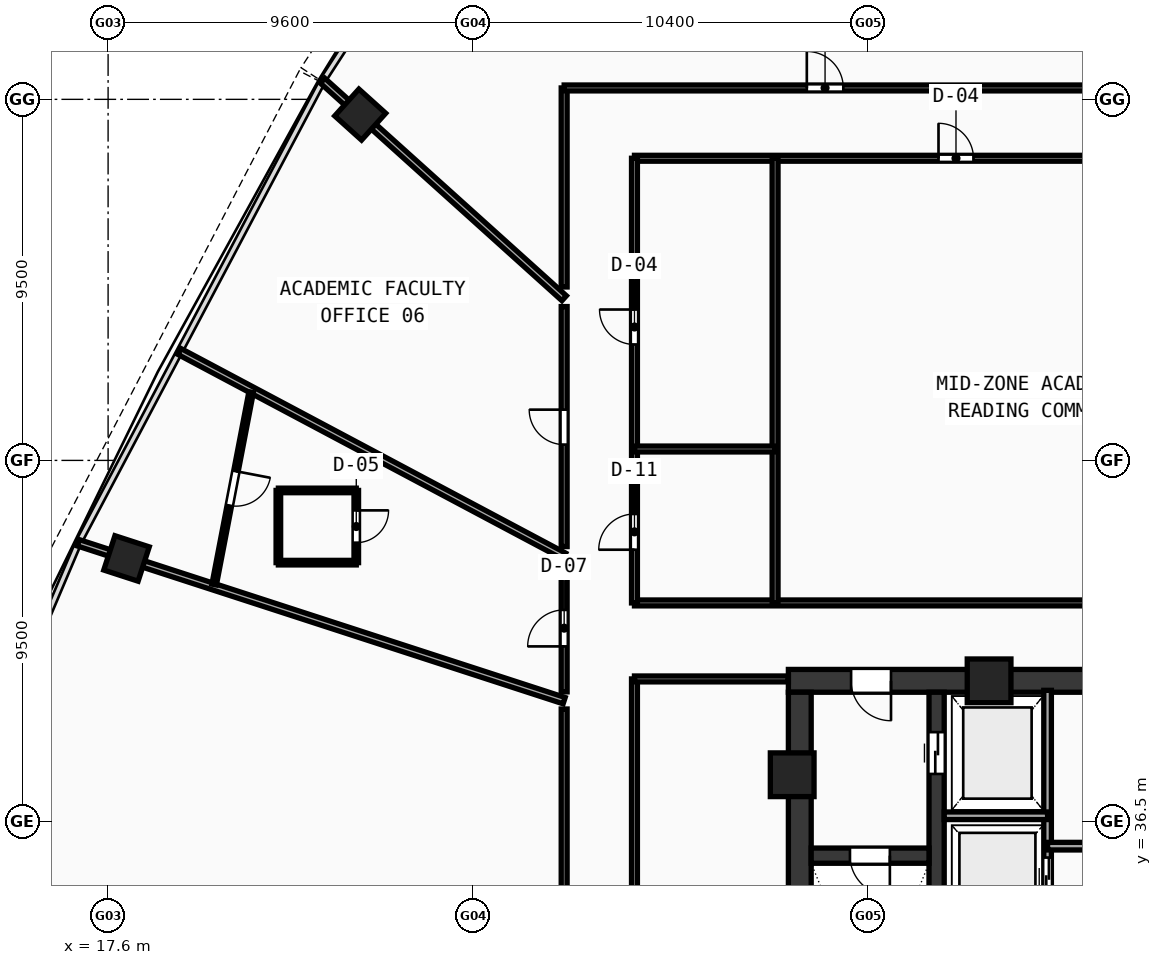
"""IFC4 building model, lengths in metres.
Left out: names, types, materials, properties, quantities, classifications, styles, units other than length and angle.
Written with IfcOpenShell. Run it as: python <this file> out.ifc"""

import sys

from ifc_helpers import new_model, si_unit, direction, frame, frame_2d, origin, origin_with_axes, origin_2d, place, context, subcontext, project, spatial, rectangle, hollow_rectangle, extrude, source, transform, mapped, element, fill, save


model = new_model("IFC4")
c1 = context("Model", 3, precision=1e-05, world=origin(), true_north=direction((0.0, 1.0)))
c2 = subcontext(c1, "Body", "Model", "MODEL_VIEW")
j1 = project(units=[si_unit("LENGTHUNIT", "METRE"), si_unit("PLANEANGLEUNIT", "RADIAN")], contexts=[c1])
p1 = place(None, origin())
s1 = spatial("IfcSite", under=j1, at=p1, CompositionType="ELEMENT")
p2 = place(p1, origin())
s2 = spatial("IfcBuilding", under=s1, at=p2, CompositionType="ELEMENT")
p3 = place(p2, frame((0.0, 0.0, 151.91)))
s3 = spatial("IfcBuildingStorey", under=s2, at=p3, CompositionType="ELEMENT", Elevation=151.91)
p4 = place(p3, frame((35.5, 40.2, 0.0), z_axis=(0.0, 0.0, 1.0), x_axis=(1.0, 0.0, 0.0)))
e1 = element("IfcWall", 1, at=p4, inside=s3, PredefinedType="SHEAR", context=c2, shape_type="SweptSolid", body=[
    extrude(rectangle(XDim=11.3, YDim=0.6, at=frame_2d((5.65, 0.0))), origin(), (0.0, 0.0, 1.0), 3.42),
])
p5 = place(p4, frame((1.65, 0.0, 0.0)))
e2 = element("IfcOpeningElement", 2, at=p5, cuts=e1, PredefinedType="OPENING", context=c2, shape_type="SweptSolid", body=[
    extrude(rectangle(XDim=1.05, YDim=2.1, at=frame_2d((0.525, 1.05))), frame((0.0, 0.31, 0.0), z_axis=(0.0, -1.0, 0.0), x_axis=(1.0, 0.0, 0.0)), (0.0, 0.0, 1.0), 0.62),
])
p6 = place(p3, frame((35.8, 27.8, 0.0), z_axis=(0.0, 0.0, 1.0), x_axis=(0.0, 1.0, 0.0)))
e3 = element("IfcWall", 3, at=p6, inside=s3, PredefinedType="SHEAR", context=c2, shape_type="SweptSolid", body=[
    extrude(rectangle(XDim=12.1, YDim=0.6, at=frame_2d((6.05, 0.0))), origin(), (0.0, 0.0, 1.0), 3.42),
])
p7 = place(p3, frame((39.4, 27.8, 0.0), z_axis=(0.0, 0.0, 1.0), x_axis=(0.0, 1.0, 0.0)))
e4 = element("IfcWall", 4, at=p7, inside=s3, PredefinedType="SHEAR", context=c2, shape_type="SweptSolid", body=[
    extrude(rectangle(XDim=12.1, YDim=0.4, at=frame_2d((6.05, 0.0))), origin(), (0.0, 0.0, 1.0), 3.42),
])
p8 = place(p7, frame((9.95, 0.0, 0.0)))
e5 = element("IfcOpeningElement", 5, at=p8, cuts=e4, PredefinedType="OPENING", context=c2, shape_type="SweptSolid", body=[
    extrude(rectangle(XDim=1.1, YDim=2.1, at=frame_2d((0.55, 1.05))), frame((0.0, 0.21, 0.0), z_axis=(0.0, -1.0, 0.0), x_axis=(1.0, 0.0, 0.0)), (0.0, 0.0, 1.0), 0.42),
])
p9 = place(p3, frame((36.1, 35.6, 0.0), z_axis=(0.0, 0.0, 1.0), x_axis=(1.0, 0.0, 0.0)))
e6 = element("IfcWall", 6, at=p9, inside=s3, PredefinedType="SHEAR", context=c2, shape_type="SweptSolid", body=[
    extrude(rectangle(XDim=3.1, YDim=0.4, at=frame_2d((1.55, 0.0))), origin(), (0.0, 0.0, 1.0), 3.42),
])
p10 = place(p9, frame((1.02, 0.0, 0.0)))
e7 = element("IfcOpeningElement", 7, at=p10, cuts=e6, PredefinedType="OPENING", context=c2, shape_type="SweptSolid", body=[
    extrude(rectangle(XDim=1.05, YDim=2.1, at=frame_2d((0.525, 1.05))), frame((0.0, 0.21, 0.0), z_axis=(0.0, -1.0, 0.0), x_axis=(1.0, 0.0, 0.0)), (0.0, 0.0, 1.0), 0.42),
])
m1 = source(origin(), c2, "Body", "SweptSolid", [
    extrude(hollow_rectangle(XDim=1.15, YDim=1.15, WallThickness=0.048, at=origin_2d()), origin(), (0.0, 0.0, 1.0), 3.68),
])
for number, where, z_axis, x_axis in (
    (8, (40.781, 40.2, -0.26), (0.0, 0.0, 1.0), (1.0, 0.0, 0.0)),
    (9, (35.6, 37.729, -0.26), (0.0, 0.0, 1.0), (1.0, 0.0, 0.0)),
):
    element("IfcColumn", number, at=place(p3, frame(where, z_axis=z_axis, x_axis=x_axis)), inside=s3, PredefinedType="COLUMN", context=c2, shape_type="MappedRepresentation", body=[
        mapped(m1, transform((0.0, 0.0, 0.0), scale=1.0)),
    ])
m2 = source(origin(), c2, "Body", "SweptSolid", [
    extrude(hollow_rectangle(XDim=0.95, YDim=0.95, WallThickness=0.04, at=origin_2d()), origin(), (0.0, 0.0, 1.0), 3.68),
])
for number, where, z_axis, x_axis in (
    (10, (24.234, 55.099, -0.26), (0.0, 0.0, 1.0), (-0.669, -0.743, 0.0)),
    (11, (18.085, 43.42, -0.26), (0.0, 0.0, 1.0), (-0.309, -0.951, 0.0)),
):
    element("IfcColumn", number, at=place(p3, frame(where, z_axis=z_axis, x_axis=x_axis)), inside=s3, PredefinedType="COLUMN", context=c2, shape_type="MappedRepresentation", body=[
        mapped(m2, transform((0.0, 0.0, 0.0), scale=1.0)),
    ])
p11 = place(p3, frame((42.32, 33.5, 0.0), z_axis=(0.0, 0.0, 1.0), x_axis=(0.0, 1.0, 0.0)))
e12 = element("IfcWall", 12, at=p11, inside=s3, PredefinedType="SOLIDWALL", context=c2, shape_type="SweptSolid", body=[
    extrude(rectangle(XDim=6.45, YDim=0.2, at=frame_2d((3.225, 0.0))), origin(), (0.0, 0.0, 1.0), 3.42),
])
p12 = place(p11, frame((1.0, 0.0, 0.0)))
e13 = element("IfcOpeningElement", 13, at=p12, cuts=e12, PredefinedType="OPENING", context=c2, shape_type="SweptSolid", body=[
    extrude(rectangle(XDim=1.05, YDim=2.1, at=frame_2d((0.525, 1.05))), frame((0.0, 0.11, 0.0), z_axis=(0.0, -1.0, 0.0), x_axis=(1.0, 0.0, 0.0)), (0.0, 0.0, 1.0), 0.22),
])
p13 = place(p3, frame((39.6, 36.65, 0.0), z_axis=(0.0, 0.0, 1.0), x_axis=(1.0, 0.0, 0.0)))
e14 = element("IfcWall", 14, at=p13, inside=s3, PredefinedType="SOLIDWALL", context=c2, shape_type="SweptSolid", body=[
    extrude(rectangle(XDim=2.72, YDim=0.2, at=frame_2d((1.36, 0.0))), origin(), (0.0, 0.0, 1.0), 3.42),
])
p14 = place(p3, frame((42.32, 35.85, 0.0), z_axis=(0.0, 0.0, 1.0), x_axis=(1.0, 0.0, 0.0)))
e15 = element("IfcWall", 15, at=p14, inside=s3, PredefinedType="SOLIDWALL", context=c2, shape_type="SweptSolid", body=[
    extrude(rectangle(XDim=4.73, YDim=0.2, at=frame_2d((2.365, 0.0))), origin(), (0.0, 0.0, 1.0), 3.42),
])
p15 = place(p14, frame((1.8, 0.0, 0.0)))
e16 = element("IfcOpeningElement", 16, at=p15, cuts=e15, PredefinedType="OPENING", context=c2, shape_type="SweptSolid", body=[
    extrude(rectangle(XDim=0.9, YDim=2.1, at=frame_2d((0.45, 1.05))), frame((0.0, 0.11, 0.0), z_axis=(0.0, -1.0, 0.0), x_axis=(1.0, 0.0, 0.0)), (0.0, 0.0, 1.0), 0.22),
])
p16 = place(p3, frame((31.45, 42.25, 0.0), z_axis=(0.0, 0.0, 1.0), x_axis=(1.0, 0.0, 0.0)))
e17 = element("IfcWall", 17, at=p16, inside=s3, PredefinedType="PARTITIONING", context=c2, shape_type="SweptSolid", body=[
    extrude(rectangle(XDim=33.1, YDim=0.155, at=frame_2d((16.55, 0.0))), origin(), (0.0, 0.0, 1.0), 2.77),
])
p17 = place(p3, frame((31.45, 53.95, 0.0), z_axis=(0.0, 0.0, 1.0), x_axis=(1.0, 0.0, 0.0)))
e18 = element("IfcWall", 18, at=p17, inside=s3, PredefinedType="PARTITIONING", context=c2, shape_type="SweptSolid", body=[
    extrude(rectangle(XDim=33.1, YDim=0.155, at=frame_2d((16.55, 0.0))), origin(), (0.0, 0.0, 1.0), 2.77),
])
p18 = place(p17, frame((8.0, 0.0, 0.0)))
e19 = element("IfcOpeningElement", 19, at=p18, cuts=e18, PredefinedType="OPENING", context=c2, shape_type="SweptSolid", body=[
    extrude(rectangle(XDim=0.92, YDim=2.1, at=frame_2d((0.46, 1.05))), frame((0.0, 0.087, 0.0), z_axis=(0.0, -1.0, 0.0), x_axis=(1.0, 0.0, 0.0)), (0.0, 0.0, 1.0), 0.175),
])
p19 = place(p17, frame((20.55, 0.0, 0.0)))
e20 = element("IfcOpeningElement", 20, at=p19, cuts=e18, PredefinedType="OPENING", context=c2, shape_type="SweptSolid", body=[
    extrude(rectangle(XDim=0.92, YDim=2.1, at=frame_2d((0.46, 1.05))), frame((0.0, 0.087, 0.0), z_axis=(0.0, -1.0, 0.0), x_axis=(1.0, 0.0, 0.0)), (0.0, 0.0, 1.0), 0.175),
])
p20 = place(p3, frame((31.45, 42.25, 0.0), z_axis=(0.0, 0.0, 1.0), x_axis=(0.0, 1.0, 0.0)))
e21 = element("IfcWall", 21, at=p20, inside=s3, PredefinedType="PARTITIONING", context=c2, shape_type="SweptSolid", body=[
    extrude(rectangle(XDim=11.7, YDim=0.155, at=frame_2d((5.85, 0.0))), origin(), (0.0, 0.0, 1.0), 2.77),
])
p21 = place(p20, frame((1.4, 0.0, 0.0)))
e22 = element("IfcOpeningElement", 22, at=p21, cuts=e21, PredefinedType="OPENING", context=c2, shape_type="SweptSolid", body=[
    extrude(rectangle(XDim=0.94, YDim=2.1, at=frame_2d((0.47, 1.05))), frame((0.0, 0.087, 0.0), z_axis=(0.0, -1.0, 0.0), x_axis=(1.0, 0.0, 0.0)), (0.0, 0.0, 1.0), 0.175),
])
p22 = place(p20, frame((6.8, 0.0, 0.0)))
e23 = element("IfcOpeningElement", 23, at=p22, cuts=e21, PredefinedType="OPENING", context=c2, shape_type="SweptSolid", body=[
    extrude(rectangle(XDim=0.92, YDim=2.1, at=frame_2d((0.46, 1.05))), frame((0.0, 0.087, 0.0), z_axis=(0.0, -1.0, 0.0), x_axis=(1.0, 0.0, 0.0)), (0.0, 0.0, 1.0), 0.175),
])
p23 = place(p3, frame((35.15, 42.25, 0.0), z_axis=(0.0, 0.0, 1.0), x_axis=(0.0, 1.0, 0.0)))
e24 = element("IfcWall", 24, at=p23, inside=s3, PredefinedType="PARTITIONING", context=c2, shape_type="SweptSolid", body=[
    extrude(rectangle(XDim=11.7, YDim=0.155, at=frame_2d((5.85, 0.0))), origin(), (0.0, 0.0, 1.0), 2.77),
])
p24 = place(p3, frame((31.45, 46.3, 0.0), z_axis=(0.0, 0.0, 1.0), x_axis=(1.0, 0.0, 0.0)))
e25 = element("IfcWall", 25, at=p24, inside=s3, PredefinedType="PARTITIONING", context=c2, shape_type="SweptSolid", body=[
    extrude(rectangle(XDim=3.7, YDim=0.155, at=frame_2d((1.85, 0.0))), origin(), (0.0, 0.0, 1.0), 2.77),
])
p25 = place(p3, frame((31.45, 23.65, 0.0), z_axis=(0.0, 0.0, 1.0), x_axis=(0.0, 1.0, 0.0)))
e26 = element("IfcWall", 26, at=p25, inside=s3, PredefinedType="PARTITIONING", context=c2, shape_type="SweptSolid", body=[
    extrude(rectangle(XDim=16.6, YDim=0.155, at=frame_2d((8.3, 0.0))), origin(), (0.0, 0.0, 1.0), 2.77),
])
p26 = place(p25, frame((7.5, 0.0, 0.0)))
e27 = element("IfcOpeningElement", 27, at=p26, cuts=e26, PredefinedType="OPENING", context=c2, shape_type="SweptSolid", body=[
    extrude(rectangle(XDim=0.9, YDim=2.08, at=frame_2d((0.45, 1.04))), frame((0.0, 0.087, 0.0), z_axis=(0.0, -1.0, 0.0), x_axis=(1.0, 0.0, 0.0)), (0.0, 0.0, 1.0), 0.175),
])
p27 = place(p3, frame((31.45, 40.25, 0.0), z_axis=(0.0, 0.0, 1.0), x_axis=(1.0, 0.0, 0.0)))
e28 = element("IfcWall", 28, at=p27, inside=s3, PredefinedType="PARTITIONING", context=c2, shape_type="SweptSolid", body=[
    extrude(rectangle(XDim=4.05, YDim=0.155, at=frame_2d((2.025, 0.0))), origin(), (0.0, 0.0, 1.0), 3.42),
])
p28 = place(p3, frame((29.6, 50.267, 0.0), z_axis=(0.0, 0.0, 1.0), x_axis=(-0.743147926867, 0.669127161901, 0.0)))
e29 = element("IfcWall", 29, at=p28, inside=s3, PredefinedType="PARTITIONING", context=c2, shape_type="SweptSolid", body=[
    extrude(rectangle(XDim=8.552, YDim=0.175, at=frame_2d((4.276, 0.0))), origin(), (0.0, 0.0, 1.0), 2.77),
])
p29 = place(p3, frame((29.6, 43.483, 0.0), z_axis=(0.0, 0.0, 1.0), x_axis=(-0.882944706502, 0.469476991193, 0.0)))
e30 = element("IfcWall", 30, at=p29, inside=s3, PredefinedType="PARTITIONING", context=c2, shape_type="SweptSolid", body=[
    extrude(rectangle(XDim=11.464, YDim=0.175, at=frame_2d((5.732, 0.0))), origin(), (0.0, 0.0, 1.0), 2.77),
])
p30 = place(p3, frame((29.6, 39.678, 0.0), z_axis=(0.0, 0.0, 1.0), x_axis=(-0.951059027278, 0.309009266259, 0.0)))
e31 = element("IfcWall", 31, at=p30, inside=s3, PredefinedType="PARTITIONING", context=c2, shape_type="SweptSolid", body=[
    extrude(rectangle(XDim=13.441, YDim=0.175, at=frame_2d((6.72, 0.0))), origin(), (0.0, 0.0, 1.0), 2.77),
])
p31 = place(p3, frame((29.6, 21.8, 0.0), z_axis=(0.0, 0.0, 1.0), x_axis=(0.0, 1.0, 0.0)))
e32 = element("IfcWall", 32, at=p31, inside=s3, PredefinedType="PARTITIONING", context=c2, shape_type="SweptSolid", body=[
    extrude(rectangle(XDim=17.659, YDim=0.155, at=frame_2d((8.829, 0.0))), origin(), (0.0, 0.0, 1.0), 2.77),
])
p32 = place(p31, frame((8.234, 0.0, 0.0)))
e33 = element("IfcOpeningElement", 33, at=p32, cuts=e32, PredefinedType="OPENING", context=c2, shape_type="SweptSolid", body=[
    extrude(rectangle(XDim=0.96, YDim=2.12, at=frame_2d((0.48, 1.06))), frame((0.0, 0.087, 0.0), z_axis=(0.0, -1.0, 0.0), x_axis=(1.0, 0.0, 0.0)), (0.0, 0.0, 1.0), 0.175),
])
p33 = place(p3, frame((29.6, 39.91, 0.0), z_axis=(0.0, 0.0, 1.0), x_axis=(0.0, 1.0, 0.0)))
e34 = element("IfcWall", 34, at=p33, inside=s3, PredefinedType="PARTITIONING", context=c2, shape_type="SweptSolid", body=[
    extrude(rectangle(XDim=3.354, YDim=0.155, at=frame_2d((1.677, 0.0))), origin(), (0.0, 0.0, 1.0), 3.02),
])
p34 = place(p33, frame((1.196, 0.0, 0.0)))
e35 = element("IfcOpeningElement", 35, at=p34, cuts=e34, PredefinedType="OPENING", context=c2, shape_type="SweptSolid", body=[
    extrude(rectangle(XDim=0.96, YDim=2.12, at=frame_2d((0.48, 1.06))), frame((0.0, 0.087, 0.0), z_axis=(0.0, -1.0, 0.0), x_axis=(1.0, 0.0, 0.0)), (0.0, 0.0, 1.0), 0.175),
])
p35 = place(p3, frame((29.6, 43.733, 0.0), z_axis=(0.0, 0.0, 1.0), x_axis=(0.0, 1.0, 0.0)))
e36 = element("IfcWall", 36, at=p35, inside=s3, PredefinedType="PARTITIONING", context=c2, shape_type="SweptSolid", body=[
    extrude(rectangle(XDim=6.315, YDim=0.155, at=frame_2d((3.157, 0.0))), origin(), (0.0, 0.0, 1.0), 2.77),
])
p36 = place(p35, frame((2.683, 0.0, 0.0)))
e37 = element("IfcOpeningElement", 37, at=p36, cuts=e36, PredefinedType="OPENING", context=c2, shape_type="SweptSolid", body=[
    extrude(rectangle(XDim=0.92, YDim=2.1, at=frame_2d((0.46, 1.05))), frame((0.0, 0.087, 0.0), z_axis=(0.0, -1.0, 0.0), x_axis=(1.0, 0.0, 0.0)), (0.0, 0.0, 1.0), 0.175),
])
p37 = place(p3, frame((29.6, 50.563, 0.0), z_axis=(0.0, 0.0, 1.0), x_axis=(0.0, 1.0, 0.0)))
e38 = element("IfcWall", 38, at=p37, inside=s3, PredefinedType="PARTITIONING", context=c2, shape_type="SweptSolid", body=[
    extrude(rectangle(XDim=5.237, YDim=0.155, at=frame_2d((2.618, 0.0))), origin(), (0.0, 0.0, 1.0), 3.02),
])
p38 = place(p3, frame((29.6, 55.8, 0.0), z_axis=(0.0, 0.0, 1.0), x_axis=(1.0, 0.0, 0.0)))
e39 = element("IfcWall", 39, at=p38, inside=s3, PredefinedType="PARTITIONING", context=c2, shape_type="SweptSolid", body=[
    extrude(rectangle(XDim=14.109, YDim=0.155, at=frame_2d((7.054, 0.0))), origin(), (0.0, 0.0, 1.0), 2.77),
])
p39 = place(p38, frame((6.385, 0.0, 0.0)))
e40 = element("IfcOpeningElement", 40, at=p39, cuts=e39, PredefinedType="OPENING", context=c2, shape_type="SweptSolid", body=[
    extrude(rectangle(XDim=0.96, YDim=2.12, at=frame_2d((0.48, 1.06))), frame((0.0, 0.087, 0.0), z_axis=(0.0, -1.0, 0.0), x_axis=(1.0, 0.0, 0.0)), (0.0, 0.0, 1.0), 0.175),
])
p40 = place(p3, frame((22.08, 43.31, 0.0), z_axis=(0.0, 0.0, 1.0), x_axis=(1.0, 0.0, 0.0)))
e41 = element("IfcWall", 41, at=p40, inside=s3, PredefinedType="PARTITIONING", context=c2, shape_type="SweptSolid", body=[
    extrude(rectangle(XDim=2.05, YDim=0.12, at=frame_2d((1.025, 0.0))), origin(), (0.0, 0.0, 1.0), 3.42),
])
p41 = place(p3, frame((24.13, 43.31, 0.0), z_axis=(0.0, 0.0, 1.0), x_axis=(0.0, 1.0, 0.0)))
e42 = element("IfcWall", 42, at=p41, inside=s3, PredefinedType="PARTITIONING", context=c2, shape_type="SweptSolid", body=[
    extrude(rectangle(XDim=1.9, YDim=0.12, at=frame_2d((0.95, 0.0))), origin(), (0.0, 0.0, 1.0), 3.42),
])
p42 = place(p41, frame((0.525, 0.0, 0.0)))
e43 = element("IfcOpeningElement", 43, at=p42, cuts=e42, PredefinedType="OPENING", context=c2, shape_type="SweptSolid", body=[
    extrude(rectangle(XDim=0.85, YDim=2.1, at=frame_2d((0.425, 1.05))), frame((0.0, 0.07, 0.0), z_axis=(0.0, -1.0, 0.0), x_axis=(1.0, 0.0, 0.0)), (0.0, 0.0, 1.0), 0.14),
])
p43 = place(p3, frame((24.13, 45.21, 0.0), z_axis=(0.0, 0.0, 1.0), x_axis=(-1.0, 0.0, 0.0)))
e44 = element("IfcWall", 44, at=p43, inside=s3, PredefinedType="PARTITIONING", context=c2, shape_type="SweptSolid", body=[
    extrude(rectangle(XDim=2.05, YDim=0.12, at=frame_2d((1.025, 0.0))), origin(), (0.0, 0.0, 1.0), 3.42),
])
p44 = place(p3, frame((22.08, 45.21, 0.0), z_axis=(0.0, 0.0, 1.0), x_axis=(0.0, -1.0, 0.0)))
e45 = element("IfcWall", 45, at=p44, inside=s3, PredefinedType="PARTITIONING", context=c2, shape_type="SweptSolid", body=[
    extrude(rectangle(XDim=1.9, YDim=0.12, at=frame_2d((0.95, 0.0))), origin(), (0.0, 0.0, 1.0), 3.42),
])
p45 = place(p3, frame((21.364, 47.795, 0.0), z_axis=(0.0, 0.0, 1.0), x_axis=(-0.188731428073, -0.982028740953, 0.0)))
e46 = element("IfcWall", 46, at=p45, inside=s3, PredefinedType="PARTITIONING", context=c2, shape_type="SweptSolid", body=[
    extrude(rectangle(XDim=5.154, YDim=0.12, at=frame_2d((2.577, 0.0))), origin(), (0.0, 0.0, 1.0), 2.77),
])
p46 = place(p45, frame((2.117, 0.0, 0.0)))
e47 = element("IfcOpeningElement", 47, at=p46, cuts=e46, PredefinedType="OPENING", context=c2, shape_type="SweptSolid", body=[
    extrude(rectangle(XDim=0.92, YDim=2.1, at=frame_2d((0.46, 1.05))), frame((0.0, 0.07, 0.0), z_axis=(0.0, -1.0, 0.0), x_axis=(1.0, 0.0, 0.0)), (0.0, 0.0, 1.0), 0.14),
])
m3 = source(origin(), c2, "Body", "SweptSolid", [
    extrude(rectangle(XDim=1.05, YDim=2.1, at=frame_2d((0.525, 1.05))), frame((0.0, 0.025, 0.0), z_axis=(0.0, -1.0, 0.0), x_axis=(1.0, 0.0, 0.0)), (0.0, 0.0, 1.0), 0.05),
])
p47 = place(p10, frame((1.05, 0.0, 0.0), z_axis=(0.0, 0.0, 1.0), x_axis=(-1.0, 0.0, 0.0)))
e48 = element("IfcDoor", 48, at=p47, inside=s3, OperationType="SINGLE_SWING_LEFT", PredefinedType="DOOR", context=c2, shape_type="MappedRepresentation", body=[
    mapped(m3, transform((0.0, 0.0, 0.0), scale=1.0)),
])
fill(e7, e48)
p48 = place(p5, frame((1.05, 0.0, 0.0), z_axis=(0.0, 0.0, 1.0), x_axis=(-1.0, 0.0, 0.0)))
e49 = element("IfcDoor", 49, at=p48, inside=s3, OperationType="SINGLE_SWING_LEFT", PredefinedType="DOOR", context=c2, shape_type="MappedRepresentation", body=[
    mapped(m3, transform((0.0, 0.0, 0.0), scale=1.0)),
])
fill(e2, e49)
m4 = source(origin(), c2, "Body", "SweptSolid", [
    extrude(rectangle(XDim=1.1, YDim=2.1, at=frame_2d((0.55, 1.05))), frame((0.0, 0.025, 0.0), z_axis=(0.0, -1.0, 0.0), x_axis=(1.0, 0.0, 0.0)), (0.0, 0.0, 1.0), 0.05),
])
p49 = place(p8, frame((1.1, 0.0, 0.0), z_axis=(0.0, 0.0, 1.0), x_axis=(-1.0, 0.0, 0.0)))
e50 = element("IfcDoor", 50, at=p49, inside=s3, OperationType="DOUBLE_DOOR_SLIDING", PredefinedType="DOOR", context=c2, shape_type="MappedRepresentation", body=[
    mapped(m4, transform((0.0, 0.0, 0.0), scale=1.0)),
])
fill(e5, e50)
p50 = place(p12, origin_with_axes())
e51 = element("IfcDoor", 51, at=p50, inside=s3, OperationType="DOUBLE_DOOR_SLIDING", PredefinedType="DOOR", context=c2, shape_type="MappedRepresentation", body=[
    mapped(m3, transform((0.0, 0.0, 0.0), scale=1.0)),
])
fill(e13, e51)
m5 = source(origin(), c2, "Body", "SweptSolid", [
    extrude(rectangle(XDim=0.94, YDim=2.1, at=frame_2d((0.47, 1.05))), frame((0.0, 0.025, 0.0), z_axis=(0.0, -1.0, 0.0), x_axis=(1.0, 0.0, 0.0)), (0.0, 0.0, 1.0), 0.05),
])
p51 = place(p21, origin_with_axes())
e52 = element("IfcDoor", 52, at=p51, inside=s3, OperationType="SINGLE_SWING_LEFT", PredefinedType="DOOR", context=c2, shape_type="MappedRepresentation", body=[
    mapped(m5, transform((0.0, 0.0, 0.0), scale=1.0)),
])
fill(e22, e52)
m6 = source(origin(), c2, "Body", "SweptSolid", [
    extrude(rectangle(XDim=0.92, YDim=2.1, at=frame_2d((0.46, 1.05))), frame((0.0, 0.025, 0.0), z_axis=(0.0, -1.0, 0.0), x_axis=(1.0, 0.0, 0.0)), (0.0, 0.0, 1.0), 0.05),
])
p52 = place(p22, origin_with_axes())
e53 = element("IfcDoor", 53, at=p52, inside=s3, OperationType="SINGLE_SWING_RIGHT", PredefinedType="DOOR", context=c2, shape_type="MappedRepresentation", body=[
    mapped(m6, transform((0.0, 0.0, 0.0), scale=1.0)),
])
fill(e23, e53)
p53 = place(p18, origin_with_axes())
e54 = element("IfcDoor", 54, at=p53, inside=s3, OperationType="SINGLE_SWING_LEFT", PredefinedType="DOOR", context=c2, shape_type="MappedRepresentation", body=[
    mapped(m6, transform((0.0, 0.0, 0.0), scale=1.0)),
])
fill(e19, e54)
m7 = source(origin(), c2, "Body", "SweptSolid", [
    extrude(rectangle(XDim=0.96, YDim=2.12, at=frame_2d((0.48, 1.06))), frame((0.0, 0.025, 0.0), z_axis=(0.0, -1.0, 0.0), x_axis=(1.0, 0.0, 0.0)), (0.0, 0.0, 1.0), 0.05),
])
p54 = place(p39, origin_with_axes())
e55 = element("IfcDoor", 55, at=p54, inside=s3, OperationType="SINGLE_SWING_LEFT", PredefinedType="DOOR", context=c2, shape_type="MappedRepresentation", body=[
    mapped(m7, transform((0.0, 0.0, 0.0), scale=1.0)),
])
fill(e40, e55)
p55 = place(p36, origin_with_axes())
e56 = element("IfcDoor", 56, at=p55, inside=s3, OperationType="SINGLE_SWING_RIGHT", PredefinedType="DOOR", context=c2, shape_type="MappedRepresentation", body=[
    mapped(m6, transform((0.0, 0.0, 0.0), scale=1.0)),
])
fill(e37, e56)
p56 = place(p34, origin_with_axes())
e57 = element("IfcDoor", 57, at=p56, inside=s3, OperationType="SINGLE_SWING_LEFT", PredefinedType="DOOR", context=c2, shape_type="MappedRepresentation", body=[
    mapped(m7, transform((0.0, 0.0, 0.0), scale=1.0)),
])
fill(e35, e57)
m8 = source(origin(), c2, "Body", "SweptSolid", [
    extrude(rectangle(XDim=0.85, YDim=2.1, at=frame_2d((0.425, 1.05))), frame((0.0, 0.025, 0.0), z_axis=(0.0, -1.0, 0.0), x_axis=(1.0, 0.0, 0.0)), (0.0, 0.0, 1.0), 0.05),
])
p57 = place(p42, frame((0.85, 0.0, 0.0), z_axis=(0.0, 0.0, 1.0), x_axis=(-1.0, 0.0, 0.0)))
e58 = element("IfcDoor", 58, at=p57, inside=s3, OperationType="SINGLE_SWING_LEFT", PredefinedType="DOOR", context=c2, shape_type="MappedRepresentation", body=[
    mapped(m8, transform((0.0, 0.0, 0.0), scale=1.0)),
])
fill(e43, e58)
p58 = place(p46, origin_with_axes())
e59 = element("IfcDoor", 59, at=p58, inside=s3, OperationType="SINGLE_SWING_LEFT", PredefinedType="DOOR", context=c2, shape_type="MappedRepresentation", body=[
    mapped(m6, transform((0.0, 0.0, 0.0), scale=1.0)),
])
fill(e47, e59)
save(model, sys.argv[1])
